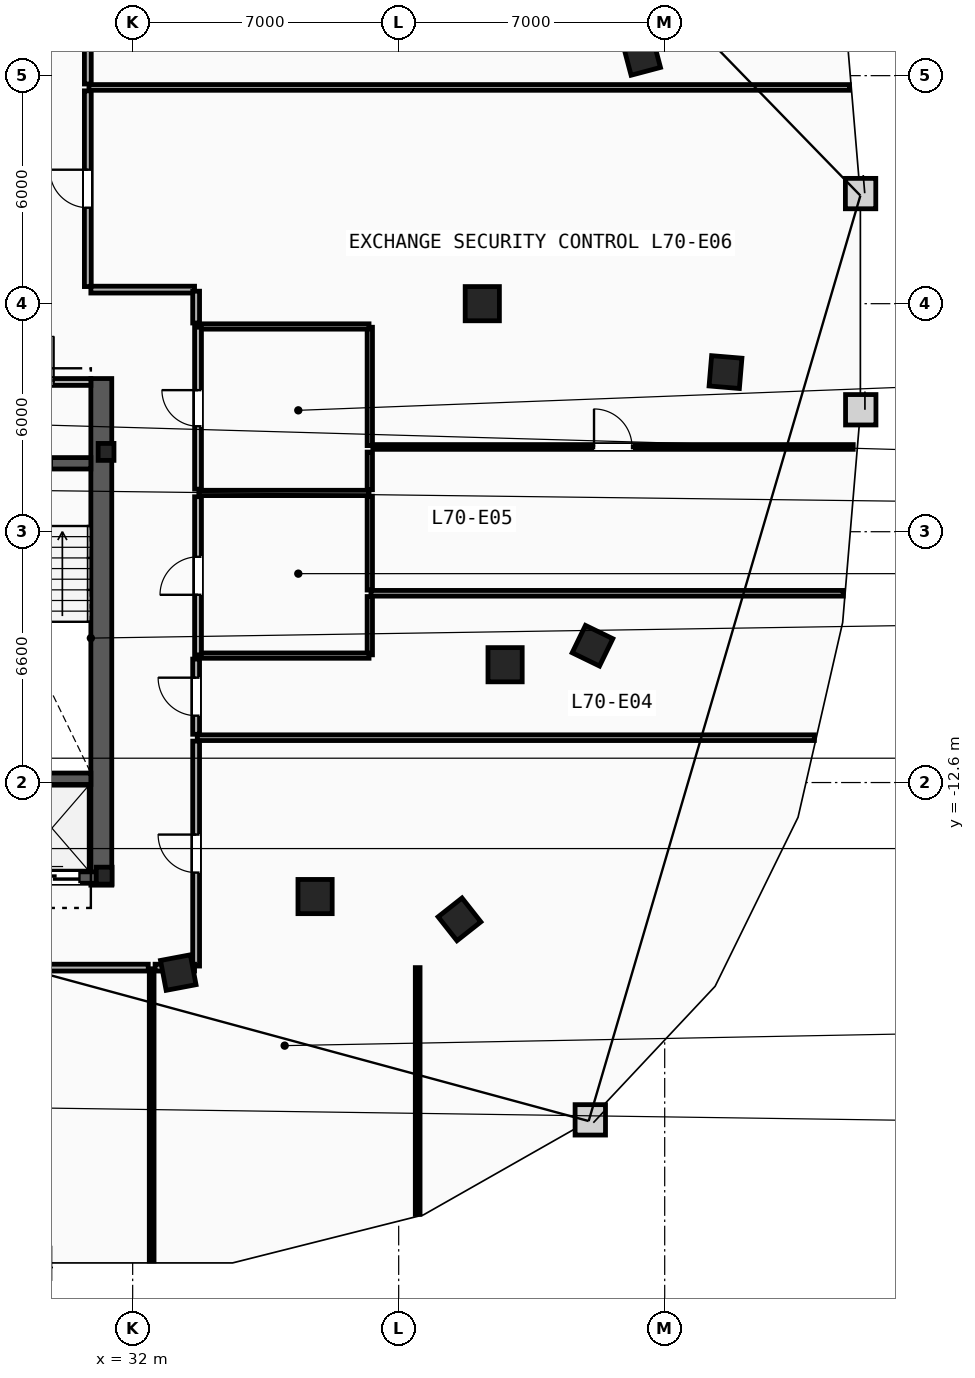
"""IFC4 building model, lengths in metres.
Left out: names, types, materials, properties, quantities, classifications, styles, units other than length and angle.
Written with IfcOpenShell. Run it as: python <this file> out.ifc"""

import sys

from ifc_helpers import new_model, si_unit, direction, frame, frame_2d, origin, origin_2d, place, context, subcontext, project, spatial, rectangle, i_section, extrude, element, fill, save


model = new_model("IFC4")
c1 = context("Model", 3, precision=1e-05, world=origin(), true_north=direction((0.0, 1.0)))
c2 = subcontext(c1, "Body", "Model", "MODEL_VIEW")
j1 = project(units=[si_unit("LENGTHUNIT", "METRE"), si_unit("PLANEANGLEUNIT", "RADIAN")], contexts=[c1])
p1 = place(None, origin())
s1 = spatial("IfcSite", under=j1, at=p1, CompositionType="ELEMENT")
p2 = place(p1, origin())
s2 = spatial("IfcBuilding", under=s1, at=p2, CompositionType="ELEMENT")
p3 = place(p2, frame((0.0, 0.0, 264.8)))
s3 = spatial("IfcBuildingStorey", under=s2, at=p3, CompositionType="ELEMENT", Elevation=264.8)
for number, where, z_axis, x_axis in (
    (1, (31.3, -3.9, 0.0), (0.0, 0.0, 1.0), (1.0, 0.0, 0.0)),
    (2, (31.25, -15.05, 0.0), (0.0, 0.0, 1.0), (1.0, 0.0, 0.0)),
):
    element("IfcColumn", number, at=place(p3, frame(where, z_axis=z_axis, x_axis=x_axis)), inside=s3, PredefinedType="COLUMN", context=c2, shape_type="SweptSolid", body=[
        extrude(i_section(OverallWidth=0.416, OverallDepth=0.446, WebThickness=0.039, FlangeThickness=0.063, FilletRadius=0.018, at=origin_2d()), origin(), (0.0, 0.0, 1.0), 3.6),
    ])
for number, where, z_axis, x_axis in (
    (3, (41.2, 0.0, 0.0), (0.0, 0.0, 1.0), (1.0, 0.0, 0.0)),
    (4, (41.8, -9.5, 0.0), (0.0, 0.0, 1.0), (1.0, 0.0, 0.0)),
    (5, (36.8, -15.6, 0.0), (0.0, 0.0, 1.0), (1.0, 0.0, 0.0)),
):
    element("IfcColumn", number, at=place(p3, frame(where, z_axis=z_axis, x_axis=x_axis)), inside=s3, PredefinedType="COLUMN", context=c2, shape_type="SweptSolid", body=[
        extrude(rectangle(XDim=0.9, YDim=0.9, at=origin_2d()), origin(), (0.0, 0.0, 1.0), 3.6),
    ])
for number, where, z_axis, x_axis in (
    (6, (33.2, -17.6, 0.0), (0.0, 0.0, 1.0), (0.983, 0.186, 0.0)),
    (7, (40.6, -16.2, 0.0), (0.0, 0.0, 1.0), (0.785, 0.619, 0.0)),
    (8, (44.1, -9.0, 0.0), (0.0, 0.0, 1.0), (0.437, 0.899, 0.0)),
    (9, (47.6, -1.8, 0.0), (0.0, 0.0, 1.0), (0.084, 0.997, 0.0)),
    (10, (45.4, 6.5, 0.0), (0.0, 0.0, 1.0), (-0.256, 0.967, 0.0)),
):
    element("IfcColumn", number, at=place(p3, frame(where, z_axis=z_axis, x_axis=x_axis)), inside=s3, PredefinedType="COLUMN", context=c2, shape_type="SweptSolid", body=[
        extrude(rectangle(XDim=0.8, YDim=0.8, at=origin_2d()), origin(), (0.0, 0.0, 1.0), 3.6),
    ])
p4 = place(p3, frame((31.175, -15.3, 0.0), z_axis=(0.0, 0.0, 1.0), x_axis=(0.0, 1.0, 0.0)))
e11 = element("IfcWall", 11, at=p4, inside=s3, PredefinedType="SHEAR", context=c2, shape_type="SweptSolid", body=[
    extrude(rectangle(XDim=13.33, YDim=0.55, at=frame_2d((6.665, 0.0))), origin(), (0.0, 0.0, 1.0), 3.34),
])
p5 = place(p3, frame((27.74, -4.2, 0.0), z_axis=(0.0, 0.0, 1.0), x_axis=(1.0, 0.0, 0.0)))
e12 = element("IfcWall", 12, at=p5, inside=s3, PredefinedType="SHEAR", context=c2, shape_type="SweptSolid", body=[
    extrude(rectangle(XDim=3.16, YDim=0.3, at=frame_2d((1.58, 0.0))), origin(), (0.0, 0.0, 1.0), 3.34),
])
p6 = place(p5, frame((1.03, 0.0, 0.0)))
e13 = element("IfcOpeningElement", 13, at=p6, cuts=e12, PredefinedType="OPENING", context=c2, shape_type="SweptSolid", body=[
    extrude(rectangle(XDim=1.1, YDim=2.15, at=frame_2d((0.55, 1.075))), frame((0.0, 0.16, 0.0), z_axis=(0.0, -1.0, 0.0), x_axis=(1.0, 0.0, 0.0)), (0.0, 0.0, 1.0), 0.32),
])
p7 = place(p3, frame((27.74, -12.5, 0.0), z_axis=(0.0, 0.0, 1.0), x_axis=(1.0, 0.0, 0.0)))
e14 = element("IfcWall", 14, at=p7, inside=s3, PredefinedType="SHEAR", context=c2, shape_type="SweptSolid", body=[
    extrude(rectangle(XDim=3.16, YDim=0.3, at=frame_2d((1.58, 0.0))), origin(), (0.0, 0.0, 1.0), 3.34),
])
p8 = place(p3, frame((27.74, -2.06, 0.0), z_axis=(0.0, 0.0, 1.0), x_axis=(1.0, 0.0, 0.0)))
e15 = element("IfcWall", 15, at=p8, inside=s3, PredefinedType="PARTITIONING", context=c2, shape_type="SweptSolid", body=[
    extrude(rectangle(XDim=3.16, YDim=0.18, at=frame_2d((1.58, 0.0))), origin(), (0.0, 0.0, 1.0), 3.34),
])
p9 = place(p8, frame((0.98, 0.0, 0.0)))
e16 = element("IfcOpeningElement", 16, at=p9, cuts=e15, PredefinedType="OPENING", context=c2, shape_type="SweptSolid", body=[
    extrude(rectangle(XDim=1.2, YDim=2.15, at=frame_2d((0.6, 1.075))), frame((0.0, 0.1, 0.0), z_axis=(0.0, -1.0, 0.0), x_axis=(1.0, 0.0, 0.0)), (0.0, 0.0, 1.0), 0.2),
])
p10 = place(p3, frame((28.7, -15.1, 0.0), z_axis=(0.0, 0.0, 1.0), x_axis=(1.0, 0.0, 0.0)))
e17 = element("IfcWall", 17, at=p10, inside=s3, PredefinedType="SHEAR", context=c2, shape_type="SweptSolid", body=[
    extrude(rectangle(XDim=2.5, YDim=0.3, at=frame_2d((1.25, 0.0))), origin(), (0.0, 0.0, 1.0), 3.34),
])
p11 = place(p10, frame((0.6, 0.0, 0.0)))
e18 = element("IfcOpeningElement", 18, at=p11, cuts=e17, PredefinedType="OPENING", context=c2, shape_type="SweptSolid", body=[
    extrude(rectangle(XDim=1.3, YDim=2.2, at=frame_2d((0.65, 1.1))), frame((0.0, 0.16, 0.0), z_axis=(0.0, -1.0, 0.0), x_axis=(1.0, 0.0, 0.0)), (0.0, 0.0, 1.0), 0.32),
])
p12 = place(p3, frame((38.24, -9.24, 0.0), z_axis=(0.0, 0.0, 1.0), x_axis=(0.0, 1.0, 0.0)))
e19 = element("IfcWall", 19, at=p12, inside=s3, PredefinedType="PARTITIONING", context=c2, shape_type="SweptSolid", body=[
    extrude(rectangle(XDim=1.535, YDim=0.14, at=frame_2d((0.768, 0.0))), origin(), (0.0, 0.0, 1.0), 3.34),
])
p13 = place(p3, frame((38.24, -7.535, 0.0), z_axis=(0.0, 0.0, 1.0), x_axis=(0.0, 1.0, 0.0)))
e20 = element("IfcWall", 20, at=p13, inside=s3, PredefinedType="PARTITIONING", context=c2, shape_type="SweptSolid", body=[
    extrude(rectangle(XDim=2.47, YDim=0.14, at=frame_2d((1.235, 0.0))), origin(), (0.0, 0.0, 1.0), 3.34),
])
p14 = place(p3, frame((38.24, -4.895, 0.0), z_axis=(0.0, 0.0, 1.0), x_axis=(0.0, 1.0, 0.0)))
e21 = element("IfcWall", 21, at=p14, inside=s3, PredefinedType="PARTITIONING", context=c2, shape_type="SweptSolid", body=[
    extrude(rectangle(XDim=0.99, YDim=0.14, at=frame_2d((0.495, 0.0))), origin(), (0.0, 0.0, 1.0), 3.34),
])
p15 = place(p3, frame((38.24, -3.735, 0.0), z_axis=(0.0, 0.0, 1.0), x_axis=(0.0, 1.0, 0.0)))
e22 = element("IfcWall", 22, at=p15, inside=s3, PredefinedType="PARTITIONING", context=c2, shape_type="SweptSolid", body=[
    extrude(rectangle(XDim=3.115, YDim=0.14, at=frame_2d((1.558, 0.0))), origin(), (0.0, 0.0, 1.0), 3.34),
])
for number, where, z_axis, x_axis in (
    (23, (33.74, -0.6, 0.0), (0.0, 0.0, 1.0), (1.0, 0.0, 0.0)),
    (24, (33.74, -4.98, 0.0), (0.0, 0.0, 1.0), (1.0, 0.0, 0.0)),
    (25, (33.74, -9.26, 0.0), (0.0, 0.0, 1.0), (1.0, 0.0, 0.0)),
):
    element("IfcWall", number, at=place(p3, frame(where, z_axis=z_axis, x_axis=x_axis)), inside=s3, PredefinedType="PARTITIONING", context=c2, shape_type="SweptSolid", body=[
        extrude(rectangle(XDim=4.48, YDim=0.14, at=frame_2d((2.24, 0.0))), origin(), (0.0, 0.0, 1.0), 3.34),
    ])
p16 = place(p3, frame((33.72, -4.88, 0.0), z_axis=(0.0, 0.0, 1.0), x_axis=(0.0, 1.0, 0.0)))
e26 = element("IfcWall", 26, at=p16, inside=s3, PredefinedType="PARTITIONING", context=c2, shape_type="SweptSolid", body=[
    extrude(rectangle(XDim=4.26, YDim=0.18, at=frame_2d((2.13, 0.0))), origin(), (0.0, 0.0, 1.0), 3.34),
])
p17 = place(p16, frame((1.655, 0.0, 0.0)))
e27 = element("IfcOpeningElement", 27, at=p17, cuts=e26, PredefinedType="OPENING", context=c2, shape_type="SweptSolid", body=[
    extrude(rectangle(XDim=0.95, YDim=2.1, at=frame_2d((0.475, 1.05))), frame((0.0, 0.1, 0.0), z_axis=(0.0, -1.0, 0.0), x_axis=(1.0, 0.0, 0.0)), (0.0, 0.0, 1.0), 0.2),
])
p18 = place(p3, frame((33.72, -9.24, 0.0), z_axis=(0.0, 0.0, 1.0), x_axis=(0.0, 1.0, 0.0)))
e28 = element("IfcWall", 28, at=p18, inside=s3, PredefinedType="PARTITIONING", context=c2, shape_type="SweptSolid", body=[
    extrude(rectangle(XDim=4.16, YDim=0.18, at=frame_2d((2.08, 0.0))), origin(), (0.0, 0.0, 1.0), 3.34),
])
p19 = place(p18, frame((1.58, 0.0, 0.0)))
e29 = element("IfcOpeningElement", 29, at=p19, cuts=e28, PredefinedType="OPENING", context=c2, shape_type="SweptSolid", body=[
    extrude(rectangle(XDim=1.0, YDim=2.15, at=frame_2d((0.5, 1.075))), frame((0.0, 0.1, 0.0), z_axis=(0.0, -1.0, 0.0), x_axis=(1.0, 0.0, 0.0)), (0.0, 0.0, 1.0), 0.2),
])
p20 = place(p3, frame((30.85, 5.69, 0.0), z_axis=(0.0, 0.0, 1.0), x_axis=(1.0, 0.0, 0.0)))
e30 = element("IfcWall", 30, at=p20, inside=s3, PredefinedType="PARTITIONING", context=c2, shape_type="SweptSolid", body=[
    extrude(rectangle(XDim=20.01, YDim=0.15, at=frame_2d((10.005, 0.0))), origin(), (0.0, 0.0, 1.0), 3.34),
])
p21 = place(p3, frame((38.27, -7.62, 0.0), z_axis=(0.0, 0.0, 1.0), x_axis=(1.0, 0.0, 0.0)))
e31 = element("IfcWall", 31, at=p21, inside=s3, PredefinedType="PARTITIONING", context=c2, shape_type="SweptSolid", body=[
    extrude(rectangle(XDim=12.427, YDim=0.15, at=frame_2d((6.214, 0.0))), origin(), (0.0, 0.0, 1.0), 3.34),
])
p22 = place(p3, frame((33.7, -11.42, 0.0), z_axis=(0.0, 0.0, 1.0), x_axis=(1.0, 0.0, 0.0)))
e32 = element("IfcWall", 32, at=p22, inside=s3, PredefinedType="PARTITIONING", context=c2, shape_type="SweptSolid", body=[
    extrude(rectangle(XDim=16.238, YDim=0.15, at=frame_2d((8.119, 0.0))), origin(), (0.0, 0.0, 1.0), 3.34),
])
p23 = place(p3, frame((32.5, -25.19, 0.0), z_axis=(0.0, 0.0, 1.0), x_axis=(0.0, 1.0, 0.0)))
e33 = element("IfcWall", 33, at=p23, inside=s3, PredefinedType="PARTITIONING", context=c2, shape_type="SweptSolid", body=[
    extrude(rectangle(XDim=7.69, YDim=0.125, at=frame_2d((3.845, 0.0))), origin(), (0.0, 0.0, 1.0), 3.34),
])
p24 = place(p3, frame((39.5, -23.963, 0.0), z_axis=(0.0, 0.0, 1.0), x_axis=(0.0, 1.0, 0.0)))
e34 = element("IfcWall", 34, at=p24, inside=s3, PredefinedType="PARTITIONING", context=c2, shape_type="SweptSolid", body=[
    extrude(rectangle(XDim=6.493, YDim=0.125, at=frame_2d((3.246, 0.0))), origin(), (0.0, 0.0, 1.0), 3.34),
])
p25 = place(p3, frame((24.59, -17.47, 0.0), z_axis=(0.0, 0.0, 1.0), x_axis=(1.0, 0.0, 0.0)))
e35 = element("IfcWall", 35, at=p25, inside=s3, PredefinedType="PARTITIONING", context=c2, shape_type="SweptSolid", body=[
    extrude(rectangle(XDim=7.82, YDim=0.18, at=frame_2d((3.91, 0.0))), origin(), (0.0, 0.0, 1.0), 3.34),
])
p26 = place(p25, frame((3.41, 0.0, 0.0)))
e36 = element("IfcOpeningElement", 36, at=p26, cuts=e35, PredefinedType="OPENING", context=c2, shape_type="SweptSolid", body=[
    extrude(rectangle(XDim=1.0, YDim=2.15, at=frame_2d((0.5, 1.075))), frame((0.0, 0.1, 0.0), z_axis=(0.0, -1.0, 0.0), x_axis=(1.0, 0.0, 0.0)), (0.0, 0.0, 1.0), 0.2),
])
p27 = place(p3, frame((33.67, -17.428, 0.0), z_axis=(0.0, 0.0, 1.0), x_axis=(0.0, 1.0, 0.0)))
e37 = element("IfcWall", 37, at=p27, inside=s3, PredefinedType="PARTITIONING", context=c2, shape_type="SweptSolid", body=[
    extrude(rectangle(XDim=5.918, YDim=0.18, at=frame_2d((2.959, 0.0))), origin(), (0.0, 0.0, 1.0), 3.34),
])
p28 = place(p27, frame((2.459, 0.0, 0.0)))
e38 = element("IfcOpeningElement", 38, at=p28, cuts=e37, PredefinedType="OPENING", context=c2, shape_type="SweptSolid", body=[
    extrude(rectangle(XDim=1.0, YDim=2.15, at=frame_2d((0.5, 1.075))), frame((0.0, 0.1, 0.0), z_axis=(0.0, -1.0, 0.0), x_axis=(1.0, 0.0, 0.0)), (0.0, 0.0, 1.0), 0.2),
])
p29 = place(p3, frame((32.59, -17.47, 0.0), z_axis=(0.0, 0.0, 1.0), x_axis=(1.0, 0.0, 0.0)))
e39 = element("IfcWall", 39, at=p29, inside=s3, PredefinedType="PARTITIONING", context=c2, shape_type="SweptSolid", body=[
    extrude(rectangle(XDim=1.038, YDim=0.18, at=frame_2d((0.519, 0.0))), origin(), (0.0, 0.0, 1.0), 3.34),
])
p30 = place(p3, frame((33.67, -11.33, 0.0), z_axis=(0.0, 0.0, 1.0), x_axis=(0.0, 1.0, 0.0)))
e40 = element("IfcWall", 40, at=p30, inside=s3, PredefinedType="PARTITIONING", context=c2, shape_type="SweptSolid", body=[
    extrude(rectangle(XDim=1.979, YDim=0.18, at=frame_2d((0.989, 0.0))), origin(), (0.0, 0.0, 1.0), 3.34),
])
p31 = place(p30, frame((0.489, 0.0, 0.0)))
e41 = element("IfcOpeningElement", 41, at=p31, cuts=e40, PredefinedType="OPENING", context=c2, shape_type="SweptSolid", body=[
    extrude(rectangle(XDim=1.0, YDim=2.15, at=frame_2d((0.5, 1.075))), frame((0.0, 0.1, 0.0), z_axis=(0.0, -1.0, 0.0), x_axis=(1.0, 0.0, 0.0)), (0.0, 0.0, 1.0), 0.2),
])
p32 = place(p3, frame((30.82, 0.45, 0.0), z_axis=(0.0, 0.0, 1.0), x_axis=(0.0, 1.0, 0.0)))
e42 = element("IfcWall", 42, at=p32, inside=s3, PredefinedType="PARTITIONING", context=c2, shape_type="SweptSolid", body=[
    extrude(rectangle(XDim=5.15, YDim=0.18, at=frame_2d((2.575, 0.0))), origin(), (0.0, 0.0, 1.0), 3.34),
])
p33 = place(p32, frame((2.075, 0.0, 0.0)))
e43 = element("IfcOpeningElement", 43, at=p33, cuts=e42, PredefinedType="OPENING", context=c2, shape_type="SweptSolid", body=[
    extrude(rectangle(XDim=1.0, YDim=2.15, at=frame_2d((0.5, 1.075))), frame((0.0, 0.1, 0.0), z_axis=(0.0, -1.0, 0.0), x_axis=(1.0, 0.0, 0.0)), (0.0, 0.0, 1.0), 0.2),
])
p34 = place(p3, frame((33.628, 0.37, 0.0), z_axis=(0.0, 0.0, 1.0), x_axis=(-1.0, 0.0, 0.0)))
e44 = element("IfcWall", 44, at=p34, inside=s3, PredefinedType="PARTITIONING", context=c2, shape_type="SweptSolid", body=[
    extrude(rectangle(XDim=2.729, YDim=0.18, at=frame_2d((1.364, 0.0))), origin(), (0.0, 0.0, 1.0), 3.34),
])
p35 = place(p3, frame((33.67, -0.509, 0.0), z_axis=(0.0, 0.0, 1.0), x_axis=(0.0, 1.0, 0.0)))
e45 = element("IfcWall", 45, at=p35, inside=s3, PredefinedType="PARTITIONING", context=c2, shape_type="SweptSolid", body=[
    extrude(rectangle(XDim=0.837, YDim=0.18, at=frame_2d((0.418, 0.0))), origin(), (0.0, 0.0, 1.0), 3.34),
])
p36 = place(p3, frame((30.82, 5.78, 0.0), z_axis=(0.0, 0.0, 1.0), x_axis=(0.0, 1.0, 0.0)))
e46 = element("IfcWall", 46, at=p36, inside=s3, PredefinedType="PARTITIONING", context=c2, shape_type="SweptSolid", body=[
    extrude(rectangle(XDim=6.999, YDim=0.18, at=frame_2d((3.499, 0.0))), origin(), (0.0, 0.0, 1.0), 3.34),
])
p37 = place(p3, frame((38.32, -3.77, 0.0), z_axis=(0.0, 0.0, 1.0), x_axis=(1.0, 0.0, 0.0)))
e47 = element("IfcWall", 47, at=p37, inside=s3, PredefinedType="PARTITIONING", context=c2, shape_type="SweptSolid", body=[
    extrude(rectangle(XDim=12.641, YDim=0.125, at=frame_2d((6.32, 0.0))), origin(), (0.0, 0.0, 1.0), 3.34),
])
p38 = place(p37, frame((5.82, 0.0, 0.0)))
e48 = element("IfcOpeningElement", 48, at=p38, cuts=e47, PredefinedType="OPENING", context=c2, shape_type="SweptSolid", body=[
    extrude(rectangle(XDim=1.0, YDim=2.15, at=frame_2d((0.5, 1.075))), frame((0.0, 0.073, 0.0), z_axis=(0.0, -1.0, 0.0), x_axis=(1.0, 0.0, 0.0)), (0.0, 0.0, 1.0), 0.145),
])
p39 = place(p9, origin())
e49 = element("IfcDoor", 49, at=p39, inside=s3, OperationType="SINGLE_SWING_RIGHT", PredefinedType="DOOR", context=c2, shape_type="SweptSolid", body=[
    extrude(rectangle(XDim=1.2, YDim=2.15, at=frame_2d((0.6, 1.075))), frame((0.0, 0.025, 0.0), z_axis=(0.0, -1.0, 0.0), x_axis=(1.0, 0.0, 0.0)), (0.0, 0.0, 1.0), 0.05),
])
fill(e16, e49)
p40 = place(p11, origin())
e50 = element("IfcDoor", 50, at=p40, inside=s3, OperationType="SLIDING_TO_LEFT", PredefinedType="TRAPDOOR", context=c2, shape_type="SweptSolid", body=[
    extrude(rectangle(XDim=1.3, YDim=2.2, at=frame_2d((0.65, 1.1))), frame((0.0, 0.025, 0.0), z_axis=(0.0, -1.0, 0.0), x_axis=(1.0, 0.0, 0.0)), (0.0, 0.0, 1.0), 0.05),
])
fill(e18, e50)
p41 = place(p38, origin())
e51 = element("IfcDoor", 51, at=p41, inside=s3, OperationType="SINGLE_SWING_LEFT", PredefinedType="DOOR", context=c2, shape_type="SweptSolid", body=[
    extrude(rectangle(XDim=1.0, YDim=2.15, at=frame_2d((0.5, 1.075))), frame((0.0, 0.025, 0.0), z_axis=(0.0, -1.0, 0.0), x_axis=(1.0, 0.0, 0.0)), (0.0, 0.0, 1.0), 0.05),
])
fill(e48, e51)
p42 = place(p28, origin())
e52 = element("IfcDoor", 52, at=p42, inside=s3, OperationType="SINGLE_SWING_RIGHT", PredefinedType="DOOR", context=c2, shape_type="SweptSolid", body=[
    extrude(rectangle(XDim=1.0, YDim=2.15, at=frame_2d((0.5, 1.075))), frame((0.0, 0.025, 0.0), z_axis=(0.0, -1.0, 0.0), x_axis=(1.0, 0.0, 0.0)), (0.0, 0.0, 1.0), 0.05),
])
fill(e38, e52)
p43 = place(p33, origin())
e53 = element("IfcDoor", 53, at=p43, inside=s3, OperationType="SINGLE_SWING_RIGHT", PredefinedType="DOOR", context=c2, shape_type="SweptSolid", body=[
    extrude(rectangle(XDim=1.0, YDim=2.15, at=frame_2d((0.5, 1.075))), frame((0.0, 0.025, 0.0), z_axis=(0.0, -1.0, 0.0), x_axis=(1.0, 0.0, 0.0)), (0.0, 0.0, 1.0), 0.05),
])
fill(e43, e53)
p44 = place(p17, origin())
e54 = element("IfcDoor", 54, at=p44, inside=s3, OperationType="SINGLE_SWING_RIGHT", PredefinedType="DOOR", context=c2, shape_type="SweptSolid", body=[
    extrude(rectangle(XDim=0.95, YDim=2.1, at=frame_2d((0.475, 1.05))), frame((0.0, 0.025, 0.0), z_axis=(0.0, -1.0, 0.0), x_axis=(1.0, 0.0, 0.0)), (0.0, 0.0, 1.0), 0.05),
])
fill(e27, e54)
p45 = place(p19, origin())
e55 = element("IfcDoor", 55, at=p45, inside=s3, OperationType="SINGLE_SWING_LEFT", PredefinedType="DOOR", context=c2, shape_type="SweptSolid", body=[
    extrude(rectangle(XDim=1.0, YDim=2.15, at=frame_2d((0.5, 1.075))), frame((0.0, 0.025, 0.0), z_axis=(0.0, -1.0, 0.0), x_axis=(1.0, 0.0, 0.0)), (0.0, 0.0, 1.0), 0.05),
])
fill(e29, e55)
p46 = place(p31, origin())
e56 = element("IfcDoor", 56, at=p46, inside=s3, OperationType="SINGLE_SWING_RIGHT", PredefinedType="DOOR", context=c2, shape_type="SweptSolid", body=[
    extrude(rectangle(XDim=1.0, YDim=2.15, at=frame_2d((0.5, 1.075))), frame((0.0, 0.025, 0.0), z_axis=(0.0, -1.0, 0.0), x_axis=(1.0, 0.0, 0.0)), (0.0, 0.0, 1.0), 0.05),
])
fill(e41, e56)
save(model, sys.argv[1])
